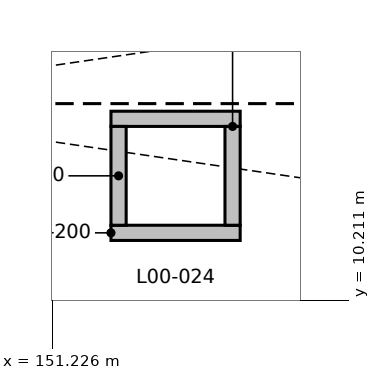
"""IFC4 building model, lengths in metres.
Left out: names, types, materials, properties, quantities, classifications, styles, units other than length and angle.
Written with IfcOpenShell. Run it as: python <this file> out.ifc"""

import sys

from ifc_helpers import new_model, si_unit, direction, frame, frame_2d, origin, place, context, subcontext, project, spatial, rectangle, extrude, element, save


model = new_model("IFC4")
c1 = context("Model", 3, precision=1e-05, world=origin(), true_north=direction((0.0, 1.0)))
c2 = subcontext(c1, "Body", "Model", "MODEL_VIEW")
j1 = project(units=[si_unit("LENGTHUNIT", "METRE"), si_unit("PLANEANGLEUNIT", "RADIAN")], contexts=[c1])
p1 = place(None, origin())
s1 = spatial("IfcSite", under=j1, at=p1, CompositionType="ELEMENT")
p2 = place(p1, origin())
s2 = spatial("IfcBuilding", under=s1, at=p2, CompositionType="ELEMENT")
p3 = place(p2, origin())
s3 = spatial("IfcBuildingStorey", under=s2, at=p3, CompositionType="ELEMENT", Elevation=0.0)
p4 = place(p3, frame((152.0, 11.1, 0.0), z_axis=(0.0, 0.0, 1.0), x_axis=(1.0, 0.0, 0.0)))
e1 = element("IfcWall", 1, at=p4, inside=s3, PredefinedType="PARTITIONING", context=c2, shape_type="SweptSolid", body=[
    extrude(rectangle(XDim=1.7, YDim=0.2, at=frame_2d((0.85, 0.0))), origin(), (0.0, 0.0, 1.0), 5.1),
])
p5 = place(p3, frame((153.7, 12.6, 0.0), z_axis=(0.0, 0.0, 1.0), x_axis=(-1.0, 0.0, 0.0)))
e2 = element("IfcWall", 2, at=p5, inside=s3, PredefinedType="PARTITIONING", context=c2, shape_type="SweptSolid", body=[
    extrude(rectangle(XDim=1.7, YDim=0.2, at=frame_2d((0.85, 0.0))), origin(), (0.0, 0.0, 1.0), 4.692),
])
for number, where, z_axis, x_axis in (
    (3, (152.1, 11.2, 0.0), (0.0, 0.0, 1.0), (0.0, 1.0, 0.0)),
    (4, (153.6, 12.5, 0.0), (0.0, 0.0, 1.0), (0.0, -1.0, 0.0)),
):
    element("IfcWall", number, at=place(p3, frame(where, z_axis=z_axis, x_axis=x_axis)), inside=s3, PredefinedType="PARTITIONING", context=c2, shape_type="SweptSolid", body=[
        extrude(rectangle(XDim=1.3, YDim=0.2, at=frame_2d((0.65, 0.0))), origin(), (0.0, 0.0, 1.0), 5.1),
    ])
save(model, sys.argv[1])
